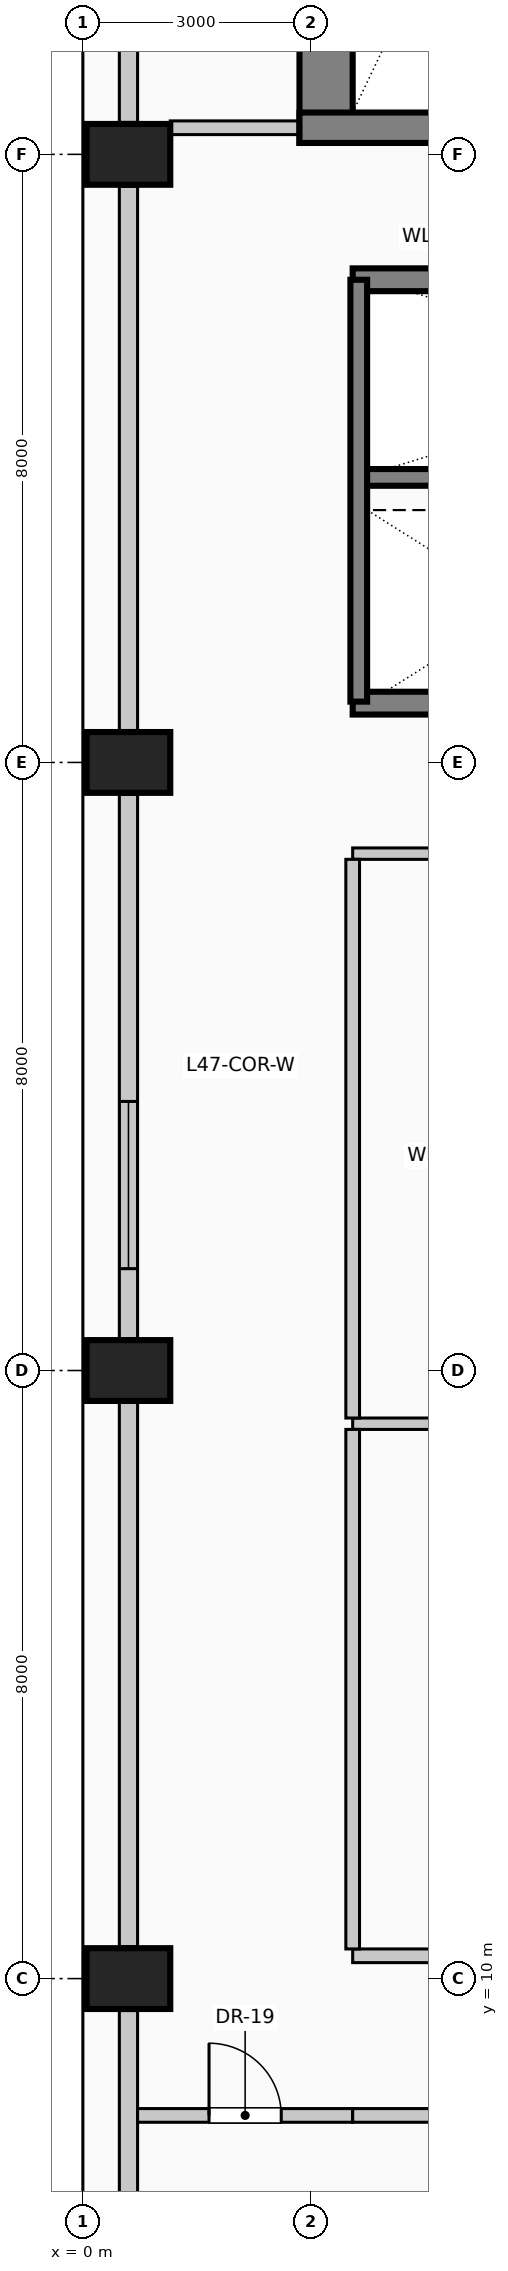
"""IFC4 building model, lengths in metres.
Left out: names, types, materials, properties, quantities, classifications, styles, units other than length and angle.
Written with IfcOpenShell. Run it as: python <this file> out.ifc"""

import sys

from ifc_helpers import new_model, si_unit, direction, frame, frame_2d, origin, origin_2d, place, context, subcontext, project, spatial, rectangle, extrude, element, fill, save


model = new_model("IFC4")
c1 = context("Model", 3, precision=1e-05, world=origin(), true_north=direction((0.0, 1.0)))
c2 = subcontext(c1, "Body", "Model", "MODEL_VIEW")
j1 = project(units=[si_unit("LENGTHUNIT", "METRE"), si_unit("PLANEANGLEUNIT", "RADIAN")], contexts=[c1])
p1 = place(None, origin())
s1 = spatial("IfcSite", under=j1, at=p1, CompositionType="ELEMENT")
p2 = place(p1, origin())
s2 = spatial("IfcBuilding", under=s1, at=p2, CompositionType="ELEMENT")
p3 = place(p2, frame((0.0, 0.0, 194.6)))
s3 = spatial("IfcBuildingStorey", under=s2, at=p3, CompositionType="ELEMENT", Elevation=194.6)
p4 = place(p3, frame((3.2, 34.15, 0.0), z_axis=(0.0, 0.0, 1.0), x_axis=(0.0, 1.0, 0.0)))
e1 = element("IfcWall", 1, at=p4, inside=s3, PredefinedType="SHEAR", context=c2, shape_type="SweptSolid", body=[
    extrude(rectangle(XDim=8.98, YDim=0.7, at=frame_2d((4.49, 0.0))), origin(), (0.0, 0.0, 1.0), 4.0),
])
p5 = place(p3, frame((2.85, 34.35, 0.0), z_axis=(0.0, 0.0, 1.0), x_axis=(1.0, 0.0, 0.0)))
e2 = element("IfcWall", 2, at=p5, inside=s3, PredefinedType="SHEAR", context=c2, shape_type="SweptSolid", body=[
    extrude(rectangle(XDim=4.86, YDim=0.4, at=frame_2d((2.43, 0.0))), origin(), (0.0, 0.0, 1.0), 4.0),
])
p6 = place(p5, frame((2.4, 0.0, 0.0)))
e3 = element("IfcOpeningElement", 3, at=p6, cuts=e2, PredefinedType="OPENING", context=c2, shape_type="SweptSolid", body=[
    extrude(rectangle(XDim=1.15, YDim=2.2, at=frame_2d((0.575, 1.1))), frame((0.0, 0.21, 0.0), z_axis=(0.0, -1.0, 0.0), x_axis=(1.0, 0.0, 0.0)), (0.0, 0.0, 1.0), 0.42),
])
for number, where, z_axis, x_axis in (
    (4, (0.6, 10.0, 0.0), (0.0, 0.0, 1.0), (0.0, 1.0, 0.0)),
    (5, (0.6, 18.0, 0.0), (0.0, 0.0, 1.0), (0.0, 1.0, 0.0)),
    (6, (0.6, 26.0, 0.0), (0.0, 0.0, 1.0), (0.0, 1.0, 0.0)),
    (7, (0.6, 34.0, 0.0), (0.0, 0.0, 1.0), (0.0, 1.0, 0.0)),
):
    element("IfcColumn", number, at=place(p3, frame(where, z_axis=z_axis, x_axis=x_axis)), inside=s3, PredefinedType="COLUMN", context=c2, shape_type="SweptSolid", body=[
        extrude(rectangle(XDim=0.8, YDim=1.1, at=origin_2d()), origin(), (0.0, 0.0, 1.0), 4.0),
    ])
p7 = place(p3, frame((0.6, 4.02, 0.0), z_axis=(0.0, 0.0, 1.0), x_axis=(0.0, 1.0, 0.0)))
e8 = element("IfcWall", 8, at=p7, inside=s3, PredefinedType="SOLIDWALL", context=c2, shape_type="SweptSolid", body=[
    extrude(rectangle(XDim=5.56, YDim=0.24, at=frame_2d((2.78, 0.0))), origin(), (0.0, 0.0, 1.0), 3.0),
])
p8 = place(p3, frame((0.6, 10.42, 0.0), z_axis=(0.0, 0.0, 1.0), x_axis=(0.0, 1.0, 0.0)))
e9 = element("IfcWall", 9, at=p8, inside=s3, PredefinedType="SOLIDWALL", context=c2, shape_type="SweptSolid", body=[
    extrude(rectangle(XDim=7.16, YDim=0.24, at=frame_2d((3.58, 0.0))), origin(), (0.0, 0.0, 1.0), 3.0),
])
p9 = place(p3, frame((0.6, 18.42, 0.0), z_axis=(0.0, 0.0, 1.0), x_axis=(0.0, 1.0, 0.0)))
e10 = element("IfcWall", 10, at=p9, inside=s3, PredefinedType="SOLIDWALL", context=c2, shape_type="SweptSolid", body=[
    extrude(rectangle(XDim=7.16, YDim=0.24, at=frame_2d((3.58, 0.0))), origin(), (0.0, 0.0, 1.0), 3.0),
])
p10 = place(p9, frame((0.92, 0.0, 0.42)))
e11 = element("IfcOpeningElement", 11, at=p10, cuts=e10, PredefinedType="OPENING", context=c2, shape_type="SweptSolid", body=[
    extrude(rectangle(XDim=2.2, YDim=1.95, at=frame_2d((1.1, 0.975))), frame((0.0, 0.13, 0.0), z_axis=(0.0, -1.0, 0.0), x_axis=(1.0, 0.0, 0.0)), (0.0, 0.0, 1.0), 0.26),
])
p11 = place(p3, frame((0.6, 26.42, 0.0), z_axis=(0.0, 0.0, 1.0), x_axis=(0.0, 1.0, 0.0)))
e12 = element("IfcWall", 12, at=p11, inside=s3, PredefinedType="SOLIDWALL", context=c2, shape_type="SweptSolid", body=[
    extrude(rectangle(XDim=7.16, YDim=0.24, at=frame_2d((3.58, 0.0))), origin(), (0.0, 0.0, 1.0), 3.0),
])
p12 = place(p3, frame((0.6, 34.42, 0.0), z_axis=(0.0, 0.0, 1.0), x_axis=(0.0, 1.0, 0.0)))
e13 = element("IfcWall", 13, at=p12, inside=s3, PredefinedType="SOLIDWALL", context=c2, shape_type="SweptSolid", body=[
    extrude(rectangle(XDim=7.56, YDim=0.24, at=frame_2d((3.78, 0.0))), origin(), (0.0, 0.0, 1.0), 3.0),
])
for number, where, z_axis, x_axis in (
    (14, (3.55, 32.35, 0.0), (0.0, 0.0, 1.0), (1.0, 0.0, 0.0)),
    (15, (5.65, 26.78, 0.0), (0.0, 0.0, 1.0), (-1.0, 0.0, 0.0)),
):
    element("IfcWall", number, at=place(p3, frame(where, z_axis=z_axis, x_axis=x_axis)), inside=s3, PredefinedType="SOLIDWALL", context=c2, shape_type="SweptSolid", body=[
        extrude(rectangle(XDim=2.1, YDim=0.3, at=frame_2d((1.05, 0.0))), origin(), (0.0, 0.0, 1.0), 4.0),
    ])
p13 = place(p3, frame((3.55, 29.75, 0.0), z_axis=(0.0, 0.0, 1.0), x_axis=(1.0, 0.0, 0.0)))
e16 = element("IfcWall", 16, at=p13, inside=s3, PredefinedType="SOLIDWALL", context=c2, shape_type="SweptSolid", body=[
    extrude(rectangle(XDim=8.65, YDim=0.22, at=frame_2d((4.325, 0.0))), origin(), (0.0, 0.0, 1.0), 4.0),
])
p14 = place(p3, frame((3.63, 26.8, 0.0), z_axis=(0.0, 0.0, 1.0), x_axis=(0.0, 1.0, 0.0)))
e17 = element("IfcWall", 17, at=p14, inside=s3, PredefinedType="SOLIDWALL", context=c2, shape_type="SweptSolid", body=[
    extrude(rectangle(XDim=5.55, YDim=0.22, at=frame_2d((2.775, 0.0))), origin(), (0.0, 0.0, 1.0), 4.0),
])
p15 = place(p3, frame((0.72, 8.2, 0.0), z_axis=(0.0, 0.0, 1.0), x_axis=(1.0, 0.0, 0.0)))
e18 = element("IfcWall", 18, at=p15, inside=s3, PredefinedType="PARTITIONING", context=c2, shape_type="SweptSolid", body=[
    extrude(rectangle(XDim=2.83, YDim=0.18, at=frame_2d((1.415, 0.0))), origin(), (0.0, 0.0, 1.0), 3.75),
])
p16 = place(p15, frame((0.94, 0.0, 0.0)))
e19 = element("IfcOpeningElement", 19, at=p16, cuts=e18, PredefinedType="OPENING", context=c2, shape_type="SweptSolid", body=[
    extrude(rectangle(XDim=0.95, YDim=2.15, at=frame_2d((0.475, 1.075))), frame((0.0, 0.1, 0.0), z_axis=(0.0, -1.0, 0.0), x_axis=(1.0, 0.0, 0.0)), (0.0, 0.0, 1.0), 0.2),
])
p17 = place(p3, frame((3.55, 8.2, 0.0), z_axis=(0.0, 0.0, 1.0), x_axis=(1.0, 0.0, 0.0)))
e20 = element("IfcWall", 20, at=p17, inside=s3, PredefinedType="PARTITIONING", context=c2, shape_type="SweptSolid", body=[
    extrude(rectangle(XDim=8.45, YDim=0.18, at=frame_2d((4.225, 0.0))), origin(), (0.0, 0.0, 1.0), 3.75),
])
p18 = place(p3, frame((3.55, 10.3, 0.0), z_axis=(0.0, 0.0, 1.0), x_axis=(1.0, 0.0, 0.0)))
e21 = element("IfcWall", 21, at=p18, inside=s3, PredefinedType="PARTITIONING", context=c2, shape_type="SweptSolid", body=[
    extrude(rectangle(XDim=7.85, YDim=0.18, at=frame_2d((3.925, 0.0))), origin(), (0.0, 0.0, 1.0), 3.75),
])
p19 = place(p18, frame((3.4, 0.0, 0.0)))
e22 = element("IfcOpeningElement", 22, at=p19, cuts=e21, PredefinedType="OPENING", context=c2, shape_type="SweptSolid", body=[
    extrude(rectangle(XDim=1.05, YDim=2.15, at=frame_2d((0.525, 1.075))), frame((0.0, 0.1, 0.0), z_axis=(0.0, -1.0, 0.0), x_axis=(1.0, 0.0, 0.0)), (0.0, 0.0, 1.0), 0.2),
])
p20 = place(p3, frame((3.55, 17.3, 0.0), z_axis=(0.0, 0.0, 1.0), x_axis=(1.0, 0.0, 0.0)))
e23 = element("IfcWall", 23, at=p20, inside=s3, PredefinedType="PARTITIONING", context=c2, shape_type="SweptSolid", body=[
    extrude(rectangle(XDim=6.25, YDim=0.15, at=frame_2d((3.125, 0.0))), origin(), (0.0, 0.0, 1.0), 3.75),
])
p21 = place(p3, frame((3.55, 24.8, 0.0), z_axis=(0.0, 0.0, 1.0), x_axis=(1.0, 0.0, 0.0)))
e24 = element("IfcWall", 24, at=p21, inside=s3, PredefinedType="PARTITIONING", context=c2, shape_type="SweptSolid", body=[
    extrude(rectangle(XDim=6.25, YDim=0.15, at=frame_2d((3.125, 0.0))), origin(), (0.0, 0.0, 1.0), 3.75),
])
p22 = place(p21, frame((2.65, 0.0, 0.0)))
e25 = element("IfcOpeningElement", 25, at=p22, cuts=e24, PredefinedType="OPENING", context=c2, shape_type="SweptSolid", body=[
    extrude(rectangle(XDim=0.95, YDim=2.15, at=frame_2d((0.475, 1.075))), frame((0.0, 0.085, 0.0), z_axis=(0.0, -1.0, 0.0), x_axis=(1.0, 0.0, 0.0)), (0.0, 0.0, 1.0), 0.17),
])
p23 = place(p3, frame((1.15, 34.35, 0.0), z_axis=(0.0, 0.0, 1.0), x_axis=(1.0, 0.0, 0.0)))
e26 = element("IfcWall", 26, at=p23, inside=s3, PredefinedType="PARTITIONING", context=c2, shape_type="SweptSolid", body=[
    extrude(rectangle(XDim=1.7, YDim=0.18, at=frame_2d((0.85, 0.0))), origin(), (0.0, 0.0, 1.0), 3.75),
])
p24 = place(p3, frame((3.55, 10.39, 0.0), z_axis=(0.0, 0.0, 1.0), x_axis=(0.0, 1.0, 0.0)))
e27 = element("IfcWall", 27, at=p24, inside=s3, PredefinedType="PARTITIONING", context=c2, shape_type="SweptSolid", body=[
    extrude(rectangle(XDim=6.835, YDim=0.18, at=frame_2d((3.417, 0.0))), origin(), (0.0, 0.0, 1.0), 3.75),
])
p25 = place(p3, frame((3.55, 17.375, 0.0), z_axis=(0.0, 0.0, 1.0), x_axis=(0.0, 1.0, 0.0)))
e28 = element("IfcWall", 28, at=p25, inside=s3, PredefinedType="PARTITIONING", context=c2, shape_type="SweptSolid", body=[
    extrude(rectangle(XDim=7.35, YDim=0.18, at=frame_2d((3.675, 0.0))), origin(), (0.0, 0.0, 1.0), 3.75),
])
p26 = place(p10, origin())
e29 = element("IfcWindow", 29, at=p26, inside=s3, PartitioningType="SINGLE_PANEL", PredefinedType="WINDOW", context=c2, shape_type="SweptSolid", body=[
    extrude(rectangle(XDim=2.2, YDim=1.95, at=frame_2d((1.1, 0.975))), frame((0.0, 0.03, 0.0), z_axis=(0.0, -1.0, 0.0), x_axis=(1.0, 0.0, 0.0)), (0.0, 0.0, 1.0), 0.06),
])
fill(e11, e29)
p27 = place(p16, origin())
e30 = element("IfcDoor", 30, at=p27, inside=s3, OperationType="SINGLE_SWING_LEFT", PredefinedType="DOOR", context=c2, shape_type="SweptSolid", body=[
    extrude(rectangle(XDim=0.95, YDim=2.15, at=frame_2d((0.475, 1.075))), frame((0.0, 0.025, 0.0), z_axis=(0.0, -1.0, 0.0), x_axis=(1.0, 0.0, 0.0)), (0.0, 0.0, 1.0), 0.05),
])
fill(e19, e30)
save(model, sys.argv[1])
